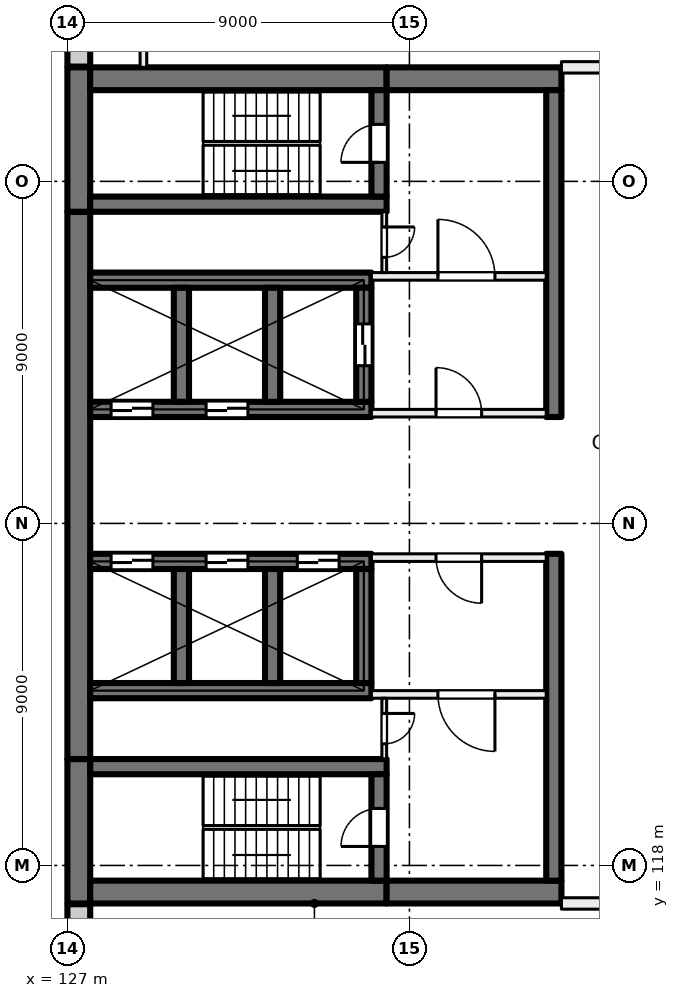
"""IFC4 building model, lengths in metres.
Left out: names, types, materials, properties, quantities, classifications, styles, units other than length and angle.
Written with IfcOpenShell. Run it as: python <this file> out.ifc"""

import sys

from ifc_helpers import new_model, si_unit, direction, frame, frame_2d, origin, place, context, subcontext, project, spatial, rectangle, extrude, element, fill, save


model = new_model("IFC4")
c1 = context("Model", 3, precision=1e-05, world=origin(), true_north=direction((0.0, 1.0)))
c2 = subcontext(c1, "Body", "Model", "MODEL_VIEW")
j1 = project(units=[si_unit("LENGTHUNIT", "METRE"), si_unit("PLANEANGLEUNIT", "RADIAN")], contexts=[c1])
p1 = place(None, origin())
s1 = spatial("IfcSite", under=j1, at=p1, CompositionType="ELEMENT")
p2 = place(p1, origin())
s2 = spatial("IfcBuilding", under=s1, at=p2, CompositionType="ELEMENT")
p3 = place(p2, frame((0.0, 0.0, 97.0)))
s3 = spatial("IfcBuildingStorey", under=s2, at=p3, CompositionType="ELEMENT", Elevation=97.0)
p4 = place(p3, frame((127.3, 117.0, 0.0), z_axis=(0.0, 0.0, 1.0), x_axis=(0.0, 1.0, 0.0)))
e1 = element("IfcWall", 1, at=p4, inside=s3, PredefinedType="SHEAR", context=c2, shape_type="SweptSolid", body=[
    extrude(rectangle(XDim=3.8, YDim=0.6, at=frame_2d((1.9, 0.0))), origin(), (0.0, 0.0, 1.0), 4.0),
])
p5 = place(p3, frame((127.3, 120.8, 0.0), z_axis=(0.0, 0.0, 1.0), x_axis=(0.0, 1.0, 0.0)))
e2 = element("IfcWall", 2, at=p5, inside=s3, PredefinedType="SHEAR", context=c2, shape_type="SweptSolid", body=[
    extrude(rectangle(XDim=14.4, YDim=0.6, at=frame_2d((7.2, 0.0))), origin(), (0.0, 0.0, 1.0), 4.0),
])
p6 = place(p3, frame((127.3, 135.2, 0.0), z_axis=(0.0, 0.0, 1.0), x_axis=(0.0, 1.0, 0.0)))
e3 = element("IfcWall", 3, at=p6, inside=s3, PredefinedType="SHEAR", context=c2, shape_type="SweptSolid", body=[
    extrude(rectangle(XDim=3.8, YDim=0.6, at=frame_2d((1.9, 0.0))), origin(), (0.0, 0.0, 1.0), 4.0),
])
for number, where, z_axis, x_axis in (
    (4, (127.6, 117.3, 0.0), (0.0, 0.0, 1.0), (1.0, 0.0, 0.0)),
    (5, (127.6, 138.7, 0.0), (0.0, 0.0, 1.0), (1.0, 0.0, 0.0)),
):
    element("IfcWall", number, at=place(p3, frame(where, z_axis=z_axis, x_axis=x_axis)), inside=s3, PredefinedType="SHEAR", context=c2, shape_type="SweptSolid", body=[
        extrude(rectangle(XDim=7.8, YDim=0.6, at=frame_2d((3.9, 0.0))), origin(), (0.0, 0.0, 1.0), 4.0),
    ])
for number, where, z_axis, x_axis in (
    (6, (135.4, 117.3, 0.0), (0.0, 0.0, 1.0), (1.0, 0.0, 0.0)),
    (7, (135.4, 138.7, 0.0), (0.0, 0.0, 1.0), (1.0, 0.0, 0.0)),
):
    element("IfcWall", number, at=place(p3, frame(where, z_axis=z_axis, x_axis=x_axis)), inside=s3, PredefinedType="SHEAR", context=c2, shape_type="SweptSolid", body=[
        extrude(rectangle(XDim=4.6, YDim=0.6, at=frame_2d((2.3, 0.0))), origin(), (0.0, 0.0, 1.0), 4.0),
    ])
p7 = place(p3, frame((127.6, 120.6, 0.0), z_axis=(0.0, 0.0, 1.0), x_axis=(1.0, 0.0, 0.0)))
e8 = element("IfcWall", 8, at=p7, inside=s3, PredefinedType="SHEAR", context=c2, shape_type="SweptSolid", body=[
    extrude(rectangle(XDim=7.8, YDim=0.4, at=frame_2d((3.9, 0.0))), origin(), (0.0, 0.0, 1.0), 4.0),
])
p8 = place(p3, frame((135.2, 117.6, 0.0), z_axis=(0.0, 0.0, 1.0), x_axis=(0.0, 1.0, 0.0)))
e9 = element("IfcWall", 9, at=p8, inside=s3, PredefinedType="SHEAR", context=c2, shape_type="SweptSolid", body=[
    extrude(rectangle(XDim=2.8, YDim=0.4, at=frame_2d((1.4, 0.0))), origin(), (0.0, 0.0, 1.0), 4.0),
])
p9 = place(p8, frame((0.9, 0.0, 0.0)))
e10 = element("IfcOpeningElement", 10, at=p9, cuts=e9, PredefinedType="OPENING", context=c2, shape_type="SweptSolid", body=[
    extrude(rectangle(XDim=1.0, YDim=2.1, at=frame_2d((0.5, 1.05))), frame((0.0, 0.21, 0.0), z_axis=(0.0, -1.0, 0.0), x_axis=(1.0, 0.0, 0.0)), (0.0, 0.0, 1.0), 0.42),
])
p10 = place(p3, frame((127.6, 135.4, 0.0), z_axis=(0.0, 0.0, 1.0), x_axis=(1.0, 0.0, 0.0)))
e11 = element("IfcWall", 11, at=p10, inside=s3, PredefinedType="SHEAR", context=c2, shape_type="SweptSolid", body=[
    extrude(rectangle(XDim=7.8, YDim=0.4, at=frame_2d((3.9, 0.0))), origin(), (0.0, 0.0, 1.0), 4.0),
])
p11 = place(p3, frame((135.2, 135.6, 0.0), z_axis=(0.0, 0.0, 1.0), x_axis=(0.0, 1.0, 0.0)))
e12 = element("IfcWall", 12, at=p11, inside=s3, PredefinedType="SHEAR", context=c2, shape_type="SweptSolid", body=[
    extrude(rectangle(XDim=2.8, YDim=0.4, at=frame_2d((1.4, 0.0))), origin(), (0.0, 0.0, 1.0), 4.0),
])
p12 = place(p11, frame((0.9, 0.0, 0.0)))
e13 = element("IfcOpeningElement", 13, at=p12, cuts=e12, PredefinedType="OPENING", context=c2, shape_type="SweptSolid", body=[
    extrude(rectangle(XDim=1.0, YDim=2.1, at=frame_2d((0.5, 1.05))), frame((0.0, 0.21, 0.0), z_axis=(0.0, -1.0, 0.0), x_axis=(1.0, 0.0, 0.0)), (0.0, 0.0, 1.0), 0.42),
])
p13 = place(p3, frame((127.6, 126.0, 0.0), z_axis=(0.0, 0.0, 1.0), x_axis=(1.0, 0.0, 0.0)))
e14 = element("IfcWall", 14, at=p13, inside=s3, PredefinedType="SHEAR", context=c2, shape_type="SweptSolid", body=[
    extrude(rectangle(XDim=7.4, YDim=0.4, at=frame_2d((3.7, 0.0))), origin(), (0.0, 0.0, 1.0), 4.0),
])
p14 = place(p13, frame((0.55, 0.0, 0.0)))
e15 = element("IfcOpeningElement", 15, at=p14, cuts=e14, PredefinedType="OPENING", context=c2, shape_type="SweptSolid", body=[
    extrude(rectangle(XDim=1.1, YDim=2.1, at=frame_2d((0.55, 1.05))), frame((0.0, 0.21, 0.0), z_axis=(0.0, -1.0, 0.0), x_axis=(1.0, 0.0, 0.0)), (0.0, 0.0, 1.0), 0.42),
])
p15 = place(p13, frame((3.05, 0.0, 0.0)))
e16 = element("IfcOpeningElement", 16, at=p15, cuts=e14, PredefinedType="OPENING", context=c2, shape_type="SweptSolid", body=[
    extrude(rectangle(XDim=1.1, YDim=2.1, at=frame_2d((0.55, 1.05))), frame((0.0, 0.21, 0.0), z_axis=(0.0, -1.0, 0.0), x_axis=(1.0, 0.0, 0.0)), (0.0, 0.0, 1.0), 0.42),
])
p16 = place(p13, frame((5.45, 0.0, 0.0)))
e17 = element("IfcOpeningElement", 17, at=p16, cuts=e14, PredefinedType="OPENING", context=c2, shape_type="SweptSolid", body=[
    extrude(rectangle(XDim=1.1, YDim=2.1, at=frame_2d((0.55, 1.05))), frame((0.0, 0.21, 0.0), z_axis=(0.0, -1.0, 0.0), x_axis=(1.0, 0.0, 0.0)), (0.0, 0.0, 1.0), 0.42),
])
p17 = place(p3, frame((127.6, 122.6, 0.0), z_axis=(0.0, 0.0, 1.0), x_axis=(1.0, 0.0, 0.0)))
e18 = element("IfcWall", 18, at=p17, inside=s3, PredefinedType="SHEAR", context=c2, shape_type="SweptSolid", body=[
    extrude(rectangle(XDim=7.4, YDim=0.4, at=frame_2d((3.7, 0.0))), origin(), (0.0, 0.0, 1.0), 4.0),
])
for number, where, z_axis, x_axis in (
    (19, (130.0, 122.8, 0.0), (0.0, 0.0, 1.0), (0.0, 1.0, 0.0)),
    (20, (132.4, 122.8, 0.0), (0.0, 0.0, 1.0), (0.0, 1.0, 0.0)),
    (21, (134.8, 122.8, 0.0), (0.0, 0.0, 1.0), (0.0, 1.0, 0.0)),
):
    element("IfcWall", number, at=place(p3, frame(where, z_axis=z_axis, x_axis=x_axis)), inside=s3, PredefinedType="SHEAR", context=c2, shape_type="SweptSolid", body=[
        extrude(rectangle(XDim=3.0, YDim=0.4, at=frame_2d((1.5, 0.0))), origin(), (0.0, 0.0, 1.0), 4.0),
    ])
p18 = place(p3, frame((127.6, 130.0, 0.0), z_axis=(0.0, 0.0, 1.0), x_axis=(1.0, 0.0, 0.0)))
e22 = element("IfcWall", 22, at=p18, inside=s3, PredefinedType="SHEAR", context=c2, shape_type="SweptSolid", body=[
    extrude(rectangle(XDim=7.4, YDim=0.4, at=frame_2d((3.7, 0.0))), origin(), (0.0, 0.0, 1.0), 4.0),
])
p19 = place(p18, frame((0.55, 0.0, 0.0)))
e23 = element("IfcOpeningElement", 23, at=p19, cuts=e22, PredefinedType="OPENING", context=c2, shape_type="SweptSolid", body=[
    extrude(rectangle(XDim=1.1, YDim=2.1, at=frame_2d((0.55, 1.05))), frame((0.0, 0.21, 0.0), z_axis=(0.0, -1.0, 0.0), x_axis=(1.0, 0.0, 0.0)), (0.0, 0.0, 1.0), 0.42),
])
p20 = place(p18, frame((3.05, 0.0, 0.0)))
e24 = element("IfcOpeningElement", 24, at=p20, cuts=e22, PredefinedType="OPENING", context=c2, shape_type="SweptSolid", body=[
    extrude(rectangle(XDim=1.1, YDim=2.1, at=frame_2d((0.55, 1.05))), frame((0.0, 0.21, 0.0), z_axis=(0.0, -1.0, 0.0), x_axis=(1.0, 0.0, 0.0)), (0.0, 0.0, 1.0), 0.42),
])
p21 = place(p3, frame((127.6, 133.4, 0.0), z_axis=(0.0, 0.0, 1.0), x_axis=(1.0, 0.0, 0.0)))
e25 = element("IfcWall", 25, at=p21, inside=s3, PredefinedType="SHEAR", context=c2, shape_type="SweptSolid", body=[
    extrude(rectangle(XDim=7.4, YDim=0.4, at=frame_2d((3.7, 0.0))), origin(), (0.0, 0.0, 1.0), 4.0),
])
for number, where, z_axis, x_axis in (
    (26, (130.0, 130.2, 0.0), (0.0, 0.0, 1.0), (0.0, 1.0, 0.0)),
    (27, (132.4, 130.2, 0.0), (0.0, 0.0, 1.0), (0.0, 1.0, 0.0)),
):
    element("IfcWall", number, at=place(p3, frame(where, z_axis=z_axis, x_axis=x_axis)), inside=s3, PredefinedType="SHEAR", context=c2, shape_type="SweptSolid", body=[
        extrude(rectangle(XDim=3.0, YDim=0.4, at=frame_2d((1.5, 0.0))), origin(), (0.0, 0.0, 1.0), 4.0),
    ])
p22 = place(p3, frame((134.8, 130.2, 0.0), z_axis=(0.0, 0.0, 1.0), x_axis=(0.0, 1.0, 0.0)))
e28 = element("IfcWall", 28, at=p22, inside=s3, PredefinedType="SHEAR", context=c2, shape_type="SweptSolid", body=[
    extrude(rectangle(XDim=3.0, YDim=0.4, at=frame_2d((1.5, 0.0))), origin(), (0.0, 0.0, 1.0), 4.0),
])
p23 = place(p22, frame((0.95, 0.0, 0.0)))
e29 = element("IfcOpeningElement", 29, at=p23, cuts=e28, PredefinedType="OPENING", context=c2, shape_type="SweptSolid", body=[
    extrude(rectangle(XDim=1.1, YDim=2.1, at=frame_2d((0.55, 1.05))), frame((0.0, 0.21, 0.0), z_axis=(0.0, -1.0, 0.0), x_axis=(1.0, 0.0, 0.0)), (0.0, 0.0, 1.0), 0.42),
])
for number, where, z_axis, x_axis in (
    (30, (139.8, 117.6, 0.0), (0.0, 0.0, 1.0), (0.0, 1.0, 0.0)),
    (31, (139.8, 129.8, 0.0), (0.0, 0.0, 1.0), (0.0, 1.0, 0.0)),
):
    element("IfcWall", number, at=place(p3, frame(where, z_axis=z_axis, x_axis=x_axis)), inside=s3, PredefinedType="SHEAR", context=c2, shape_type="SweptSolid", body=[
        extrude(rectangle(XDim=8.6, YDim=0.4, at=frame_2d((4.3, 0.0))), origin(), (0.0, 0.0, 1.0), 4.0),
    ])
p24 = place(p3, frame((127.3, 139.02, 0.0), z_axis=(0.0, 0.0, 1.0), x_axis=(0.0, 1.0, 0.0)))
e32 = element("IfcWall", 32, at=p24, inside=s3, PredefinedType="SOLIDWALL", context=c2, shape_type="SweptSolid", body=[
    extrude(rectangle(XDim=2.98, YDim=0.6, at=frame_2d((1.49, 0.0))), origin(), (0.0, 0.0, 1.0), 3.625),
])
p25 = place(p3, frame((127.3, 114.07, 0.0), z_axis=(0.0, 0.0, 1.0), x_axis=(0.0, 1.0, 0.0)))
e33 = element("IfcWall", 33, at=p25, inside=s3, PredefinedType="SOLIDWALL", context=c2, shape_type="SweptSolid", body=[
    extrude(rectangle(XDim=2.91, YDim=0.6, at=frame_2d((1.455, 0.0))), origin(), (0.0, 0.0, 1.0), 3.625),
])
p26 = place(p3, frame((135.0, 129.9, 0.0), z_axis=(0.0, 0.0, 1.0), x_axis=(1.0, 0.0, 0.0)))
e34 = element("IfcWall", 34, at=p26, inside=s3, PredefinedType="PARTITIONING", context=c2, shape_type="SweptSolid", body=[
    extrude(rectangle(XDim=4.6, YDim=0.2, at=frame_2d((2.3, 0.0))), origin(), (0.0, 0.0, 1.0), 3.625),
])
p27 = place(p26, frame((1.7, 0.0, 0.0)))
e35 = element("IfcOpeningElement", 35, at=p27, cuts=e34, PredefinedType="OPENING", context=c2, shape_type="SweptSolid", body=[
    extrude(rectangle(XDim=1.2, YDim=2.1, at=frame_2d((0.6, 1.05))), frame((0.0, 0.11, 0.0), z_axis=(0.0, -1.0, 0.0), x_axis=(1.0, 0.0, 0.0)), (0.0, 0.0, 1.0), 0.22),
])
p28 = place(p3, frame((135.0, 133.5, 0.0), z_axis=(0.0, 0.0, 1.0), x_axis=(1.0, 0.0, 0.0)))
e36 = element("IfcWall", 36, at=p28, inside=s3, PredefinedType="PARTITIONING", context=c2, shape_type="SweptSolid", body=[
    extrude(rectangle(XDim=4.6, YDim=0.2, at=frame_2d((2.3, 0.0))), origin(), (0.0, 0.0, 1.0), 3.625),
])
p29 = place(p28, frame((1.75, 0.0, 0.0)))
e37 = element("IfcOpeningElement", 37, at=p29, cuts=e36, PredefinedType="OPENING", context=c2, shape_type="SweptSolid", body=[
    extrude(rectangle(XDim=1.5, YDim=2.1, at=frame_2d((0.75, 1.05))), frame((0.0, 0.11, 0.0), z_axis=(0.0, -1.0, 0.0), x_axis=(1.0, 0.0, 0.0)), (0.0, 0.0, 1.0), 0.22),
])
p30 = place(p3, frame((135.337, 135.2, 0.0), z_axis=(0.0, 0.0, 1.0), x_axis=(0.0, -1.0, 0.0)))
e38 = element("IfcWall", 38, at=p30, inside=s3, PredefinedType="PARTITIONING", context=c2, shape_type="SweptSolid", body=[
    extrude(rectangle(XDim=1.6, YDim=0.125, at=frame_2d((0.8, 0.0))), origin(), (0.0, 0.0, 1.0), 3.625),
])
p31 = place(p30, frame((0.4, 0.0, 0.0)))
e39 = element("IfcOpeningElement", 39, at=p31, cuts=e38, PredefinedType="OPENING", context=c2, shape_type="SweptSolid", body=[
    extrude(rectangle(XDim=0.8, YDim=2.1, at=frame_2d((0.4, 1.05))), frame((0.0, 0.073, 0.0), z_axis=(0.0, -1.0, 0.0), x_axis=(1.0, 0.0, 0.0)), (0.0, 0.0, 1.0), 0.145),
])
p32 = place(p3, frame((139.6, 126.1, 0.0), z_axis=(0.0, 0.0, 1.0), x_axis=(-1.0, 0.0, 0.0)))
e40 = element("IfcWall", 40, at=p32, inside=s3, PredefinedType="PARTITIONING", context=c2, shape_type="SweptSolid", body=[
    extrude(rectangle(XDim=4.6, YDim=0.2, at=frame_2d((2.3, 0.0))), origin(), (0.0, 0.0, 1.0), 3.625),
])
p33 = place(p32, frame((1.7, 0.0, 0.0)))
e41 = element("IfcOpeningElement", 41, at=p33, cuts=e40, PredefinedType="OPENING", context=c2, shape_type="SweptSolid", body=[
    extrude(rectangle(XDim=1.2, YDim=2.1, at=frame_2d((0.6, 1.05))), frame((0.0, 0.11, 0.0), z_axis=(0.0, -1.0, 0.0), x_axis=(1.0, 0.0, 0.0)), (0.0, 0.0, 1.0), 0.22),
])
p34 = place(p3, frame((139.6, 122.5, 0.0), z_axis=(0.0, 0.0, 1.0), x_axis=(-1.0, 0.0, 0.0)))
e42 = element("IfcWall", 42, at=p34, inside=s3, PredefinedType="PARTITIONING", context=c2, shape_type="SweptSolid", body=[
    extrude(rectangle(XDim=4.6, YDim=0.2, at=frame_2d((2.3, 0.0))), origin(), (0.0, 0.0, 1.0), 3.625),
])
p35 = place(p34, frame((1.35, 0.0, 0.0)))
e43 = element("IfcOpeningElement", 43, at=p35, cuts=e42, PredefinedType="OPENING", context=c2, shape_type="SweptSolid", body=[
    extrude(rectangle(XDim=1.5, YDim=2.1, at=frame_2d((0.75, 1.05))), frame((0.0, 0.11, 0.0), z_axis=(0.0, -1.0, 0.0), x_axis=(1.0, 0.0, 0.0)), (0.0, 0.0, 1.0), 0.22),
])
p36 = place(p3, frame((135.337, 122.4, 0.0), z_axis=(0.0, 0.0, 1.0), x_axis=(0.0, -1.0, 0.0)))
e44 = element("IfcWall", 44, at=p36, inside=s3, PredefinedType="PARTITIONING", context=c2, shape_type="SweptSolid", body=[
    extrude(rectangle(XDim=1.6, YDim=0.125, at=frame_2d((0.8, 0.0))), origin(), (0.0, 0.0, 1.0), 3.625),
])
p37 = place(p36, frame((0.4, 0.0, 0.0)))
e45 = element("IfcOpeningElement", 45, at=p37, cuts=e44, PredefinedType="OPENING", context=c2, shape_type="SweptSolid", body=[
    extrude(rectangle(XDim=0.8, YDim=2.1, at=frame_2d((0.4, 1.05))), frame((0.0, 0.073, 0.0), z_axis=(0.0, -1.0, 0.0), x_axis=(1.0, 0.0, 0.0)), (0.0, 0.0, 1.0), 0.145),
])
p38 = place(p3, frame((129.0, 139.0, 0.0), z_axis=(0.0, 0.0, 1.0), x_axis=(0.0, 1.0, 0.0)))
e46 = element("IfcWall", 46, at=p38, inside=s3, PredefinedType="PARTITIONING", context=c2, shape_type="SweptSolid", body=[
    extrude(rectangle(XDim=2.888, YDim=0.175, at=frame_2d((1.444, 0.0))), origin(), (0.0, 0.0, 1.0), 3.625),
])
p39 = place(p38, frame((0.8, 0.0, 0.0)))
e47 = element("IfcOpeningElement", 47, at=p39, cuts=e46, PredefinedType="OPENING", context=c2, shape_type="SweptSolid", body=[
    extrude(rectangle(XDim=1.2, YDim=2.1, at=frame_2d((0.6, 1.05))), frame((0.0, 0.097, 0.0), z_axis=(0.0, -1.0, 0.0), x_axis=(1.0, 0.0, 0.0)), (0.0, 0.0, 1.0), 0.195),
])
p40 = place(p3, frame((144.35, 139.0, 0.0), z_axis=(0.0, 0.0, 1.0), x_axis=(-1.0, 0.0, 0.0)))
e48 = element("IfcWall", 48, at=p40, inside=s3, PredefinedType="PARTITIONING", context=c2, shape_type="SweptSolid", body=[
    extrude(rectangle(XDim=4.35, YDim=0.3, at=frame_2d((2.175, 0.0))), origin(), (0.0, 0.0, 1.0), 3.625),
])
p41 = place(p40, frame((1.667, 0.0, 0.0)))
e49 = element("IfcOpeningElement", 49, at=p41, cuts=e48, PredefinedType="OPENING", context=c2, shape_type="SweptSolid", body=[
    extrude(rectangle(XDim=1.0, YDim=2.1, at=frame_2d((0.5, 1.05))), frame((0.0, 0.16, 0.0), z_axis=(0.0, -1.0, 0.0), x_axis=(1.0, 0.0, 0.0)), (0.0, 0.0, 1.0), 0.32),
])
p42 = place(p3, frame((144.35, 117.0, 0.0), z_axis=(0.0, 0.0, 1.0), x_axis=(-1.0, 0.0, 0.0)))
e50 = element("IfcWall", 50, at=p42, inside=s3, PredefinedType="PARTITIONING", context=c2, shape_type="SweptSolid", body=[
    extrude(rectangle(XDim=4.35, YDim=0.3, at=frame_2d((2.175, 0.0))), origin(), (0.0, 0.0, 1.0), 3.625),
])
p43 = place(p42, frame((1.267, 0.0, 0.0)))
e51 = element("IfcOpeningElement", 51, at=p43, cuts=e50, PredefinedType="OPENING", context=c2, shape_type="SweptSolid", body=[
    extrude(rectangle(XDim=1.8, YDim=2.1, at=frame_2d((0.9, 1.05))), frame((0.0, 0.16, 0.0), z_axis=(0.0, -1.0, 0.0), x_axis=(1.0, 0.0, 0.0)), (0.0, 0.0, 1.0), 0.32),
])
p44 = place(p19, origin())
e52 = element("IfcDoor", 52, at=p44, inside=s3, OperationType="DOUBLE_DOOR_SLIDING", PredefinedType="DOOR", context=c2, shape_type="SweptSolid", body=[
    extrude(rectangle(XDim=1.1, YDim=2.1, at=frame_2d((0.55, 1.05))), frame((0.0, 0.025, 0.0), z_axis=(0.0, -1.0, 0.0), x_axis=(1.0, 0.0, 0.0)), (0.0, 0.0, 1.0), 0.05),
])
fill(e23, e52)
p45 = place(p20, origin())
e53 = element("IfcDoor", 53, at=p45, inside=s3, OperationType="DOUBLE_DOOR_SLIDING", PredefinedType="DOOR", context=c2, shape_type="SweptSolid", body=[
    extrude(rectangle(XDim=1.1, YDim=2.1, at=frame_2d((0.55, 1.05))), frame((0.0, 0.025, 0.0), z_axis=(0.0, -1.0, 0.0), x_axis=(1.0, 0.0, 0.0)), (0.0, 0.0, 1.0), 0.05),
])
fill(e24, e53)
p46 = place(p14, origin())
e54 = element("IfcDoor", 54, at=p46, inside=s3, OperationType="DOUBLE_DOOR_SLIDING", PredefinedType="DOOR", context=c2, shape_type="SweptSolid", body=[
    extrude(rectangle(XDim=1.1, YDim=2.1, at=frame_2d((0.55, 1.05))), frame((0.0, 0.025, 0.0), z_axis=(0.0, -1.0, 0.0), x_axis=(1.0, 0.0, 0.0)), (0.0, 0.0, 1.0), 0.05),
])
fill(e15, e54)
p47 = place(p15, origin())
e55 = element("IfcDoor", 55, at=p47, inside=s3, OperationType="DOUBLE_DOOR_SLIDING", PredefinedType="DOOR", context=c2, shape_type="SweptSolid", body=[
    extrude(rectangle(XDim=1.1, YDim=2.1, at=frame_2d((0.55, 1.05))), frame((0.0, 0.025, 0.0), z_axis=(0.0, -1.0, 0.0), x_axis=(1.0, 0.0, 0.0)), (0.0, 0.0, 1.0), 0.05),
])
fill(e16, e55)
p48 = place(p16, origin())
e56 = element("IfcDoor", 56, at=p48, inside=s3, OperationType="DOUBLE_DOOR_SLIDING", PredefinedType="DOOR", context=c2, shape_type="SweptSolid", body=[
    extrude(rectangle(XDim=1.1, YDim=2.1, at=frame_2d((0.55, 1.05))), frame((0.0, 0.025, 0.0), z_axis=(0.0, -1.0, 0.0), x_axis=(1.0, 0.0, 0.0)), (0.0, 0.0, 1.0), 0.05),
])
fill(e17, e56)
p49 = place(p27, origin())
e57 = element("IfcDoor", 57, at=p49, inside=s3, OperationType="DOUBLE_DOOR_SINGLE_SWING", PredefinedType="DOOR", context=c2, shape_type="SweptSolid", body=[
    extrude(rectangle(XDim=1.2, YDim=2.1, at=frame_2d((0.6, 1.05))), frame((0.0, 0.025, 0.0), z_axis=(0.0, -1.0, 0.0), x_axis=(1.0, 0.0, 0.0)), (0.0, 0.0, 1.0), 0.05),
])
fill(e35, e57)
p50 = place(p29, origin())
e58 = element("IfcDoor", 58, at=p50, inside=s3, OperationType="DOUBLE_DOOR_SINGLE_SWING", PredefinedType="DOOR", context=c2, shape_type="SweptSolid", body=[
    extrude(rectangle(XDim=1.5, YDim=2.1, at=frame_2d((0.75, 1.05))), frame((0.0, 0.025, 0.0), z_axis=(0.0, -1.0, 0.0), x_axis=(1.0, 0.0, 0.0)), (0.0, 0.0, 1.0), 0.05),
])
fill(e37, e58)
p51 = place(p12, origin())
e59 = element("IfcDoor", 59, at=p51, inside=s3, OperationType="SINGLE_SWING_LEFT", PredefinedType="DOOR", context=c2, shape_type="SweptSolid", body=[
    extrude(rectangle(XDim=1.0, YDim=2.1, at=frame_2d((0.5, 1.05))), frame((0.0, 0.025, 0.0), z_axis=(0.0, -1.0, 0.0), x_axis=(1.0, 0.0, 0.0)), (0.0, 0.0, 1.0), 0.05),
])
fill(e13, e59)
p52 = place(p31, origin())
e60 = element("IfcDoor", 60, at=p52, inside=s3, OperationType="SINGLE_SWING_RIGHT", PredefinedType="DOOR", context=c2, shape_type="SweptSolid", body=[
    extrude(rectangle(XDim=0.8, YDim=2.1, at=frame_2d((0.4, 1.05))), frame((0.0, 0.025, 0.0), z_axis=(0.0, -1.0, 0.0), x_axis=(1.0, 0.0, 0.0)), (0.0, 0.0, 1.0), 0.05),
])
fill(e39, e60)
p53 = place(p33, origin())
e61 = element("IfcDoor", 61, at=p53, inside=s3, OperationType="DOUBLE_DOOR_SINGLE_SWING", PredefinedType="DOOR", context=c2, shape_type="SweptSolid", body=[
    extrude(rectangle(XDim=1.2, YDim=2.1, at=frame_2d((0.6, 1.05))), frame((0.0, 0.025, 0.0), z_axis=(0.0, -1.0, 0.0), x_axis=(1.0, 0.0, 0.0)), (0.0, 0.0, 1.0), 0.05),
])
fill(e41, e61)
p54 = place(p35, origin())
e62 = element("IfcDoor", 62, at=p54, inside=s3, OperationType="DOUBLE_DOOR_SINGLE_SWING", PredefinedType="DOOR", context=c2, shape_type="SweptSolid", body=[
    extrude(rectangle(XDim=1.5, YDim=2.1, at=frame_2d((0.75, 1.05))), frame((0.0, 0.025, 0.0), z_axis=(0.0, -1.0, 0.0), x_axis=(1.0, 0.0, 0.0)), (0.0, 0.0, 1.0), 0.05),
])
fill(e43, e62)
p55 = place(p9, origin())
e63 = element("IfcDoor", 63, at=p55, inside=s3, OperationType="SINGLE_SWING_RIGHT", PredefinedType="DOOR", context=c2, shape_type="SweptSolid", body=[
    extrude(rectangle(XDim=1.0, YDim=2.1, at=frame_2d((0.5, 1.05))), frame((0.0, 0.025, 0.0), z_axis=(0.0, -1.0, 0.0), x_axis=(1.0, 0.0, 0.0)), (0.0, 0.0, 1.0), 0.05),
])
fill(e10, e63)
p56 = place(p37, origin())
e64 = element("IfcDoor", 64, at=p56, inside=s3, OperationType="SINGLE_SWING_LEFT", PredefinedType="DOOR", context=c2, shape_type="SweptSolid", body=[
    extrude(rectangle(XDim=0.8, YDim=2.1, at=frame_2d((0.4, 1.05))), frame((0.0, 0.025, 0.0), z_axis=(0.0, -1.0, 0.0), x_axis=(1.0, 0.0, 0.0)), (0.0, 0.0, 1.0), 0.05),
])
fill(e45, e64)
p57 = place(p23, origin())
e65 = element("IfcDoor", 65, at=p57, inside=s3, OperationType="DOUBLE_DOOR_SLIDING", PredefinedType="DOOR", context=c2, shape_type="SweptSolid", body=[
    extrude(rectangle(XDim=1.1, YDim=2.1, at=frame_2d((0.55, 1.05))), frame((0.0, 0.025, 0.0), z_axis=(0.0, -1.0, 0.0), x_axis=(1.0, 0.0, 0.0)), (0.0, 0.0, 1.0), 0.05),
])
fill(e29, e65)
save(model, sys.argv[1])
